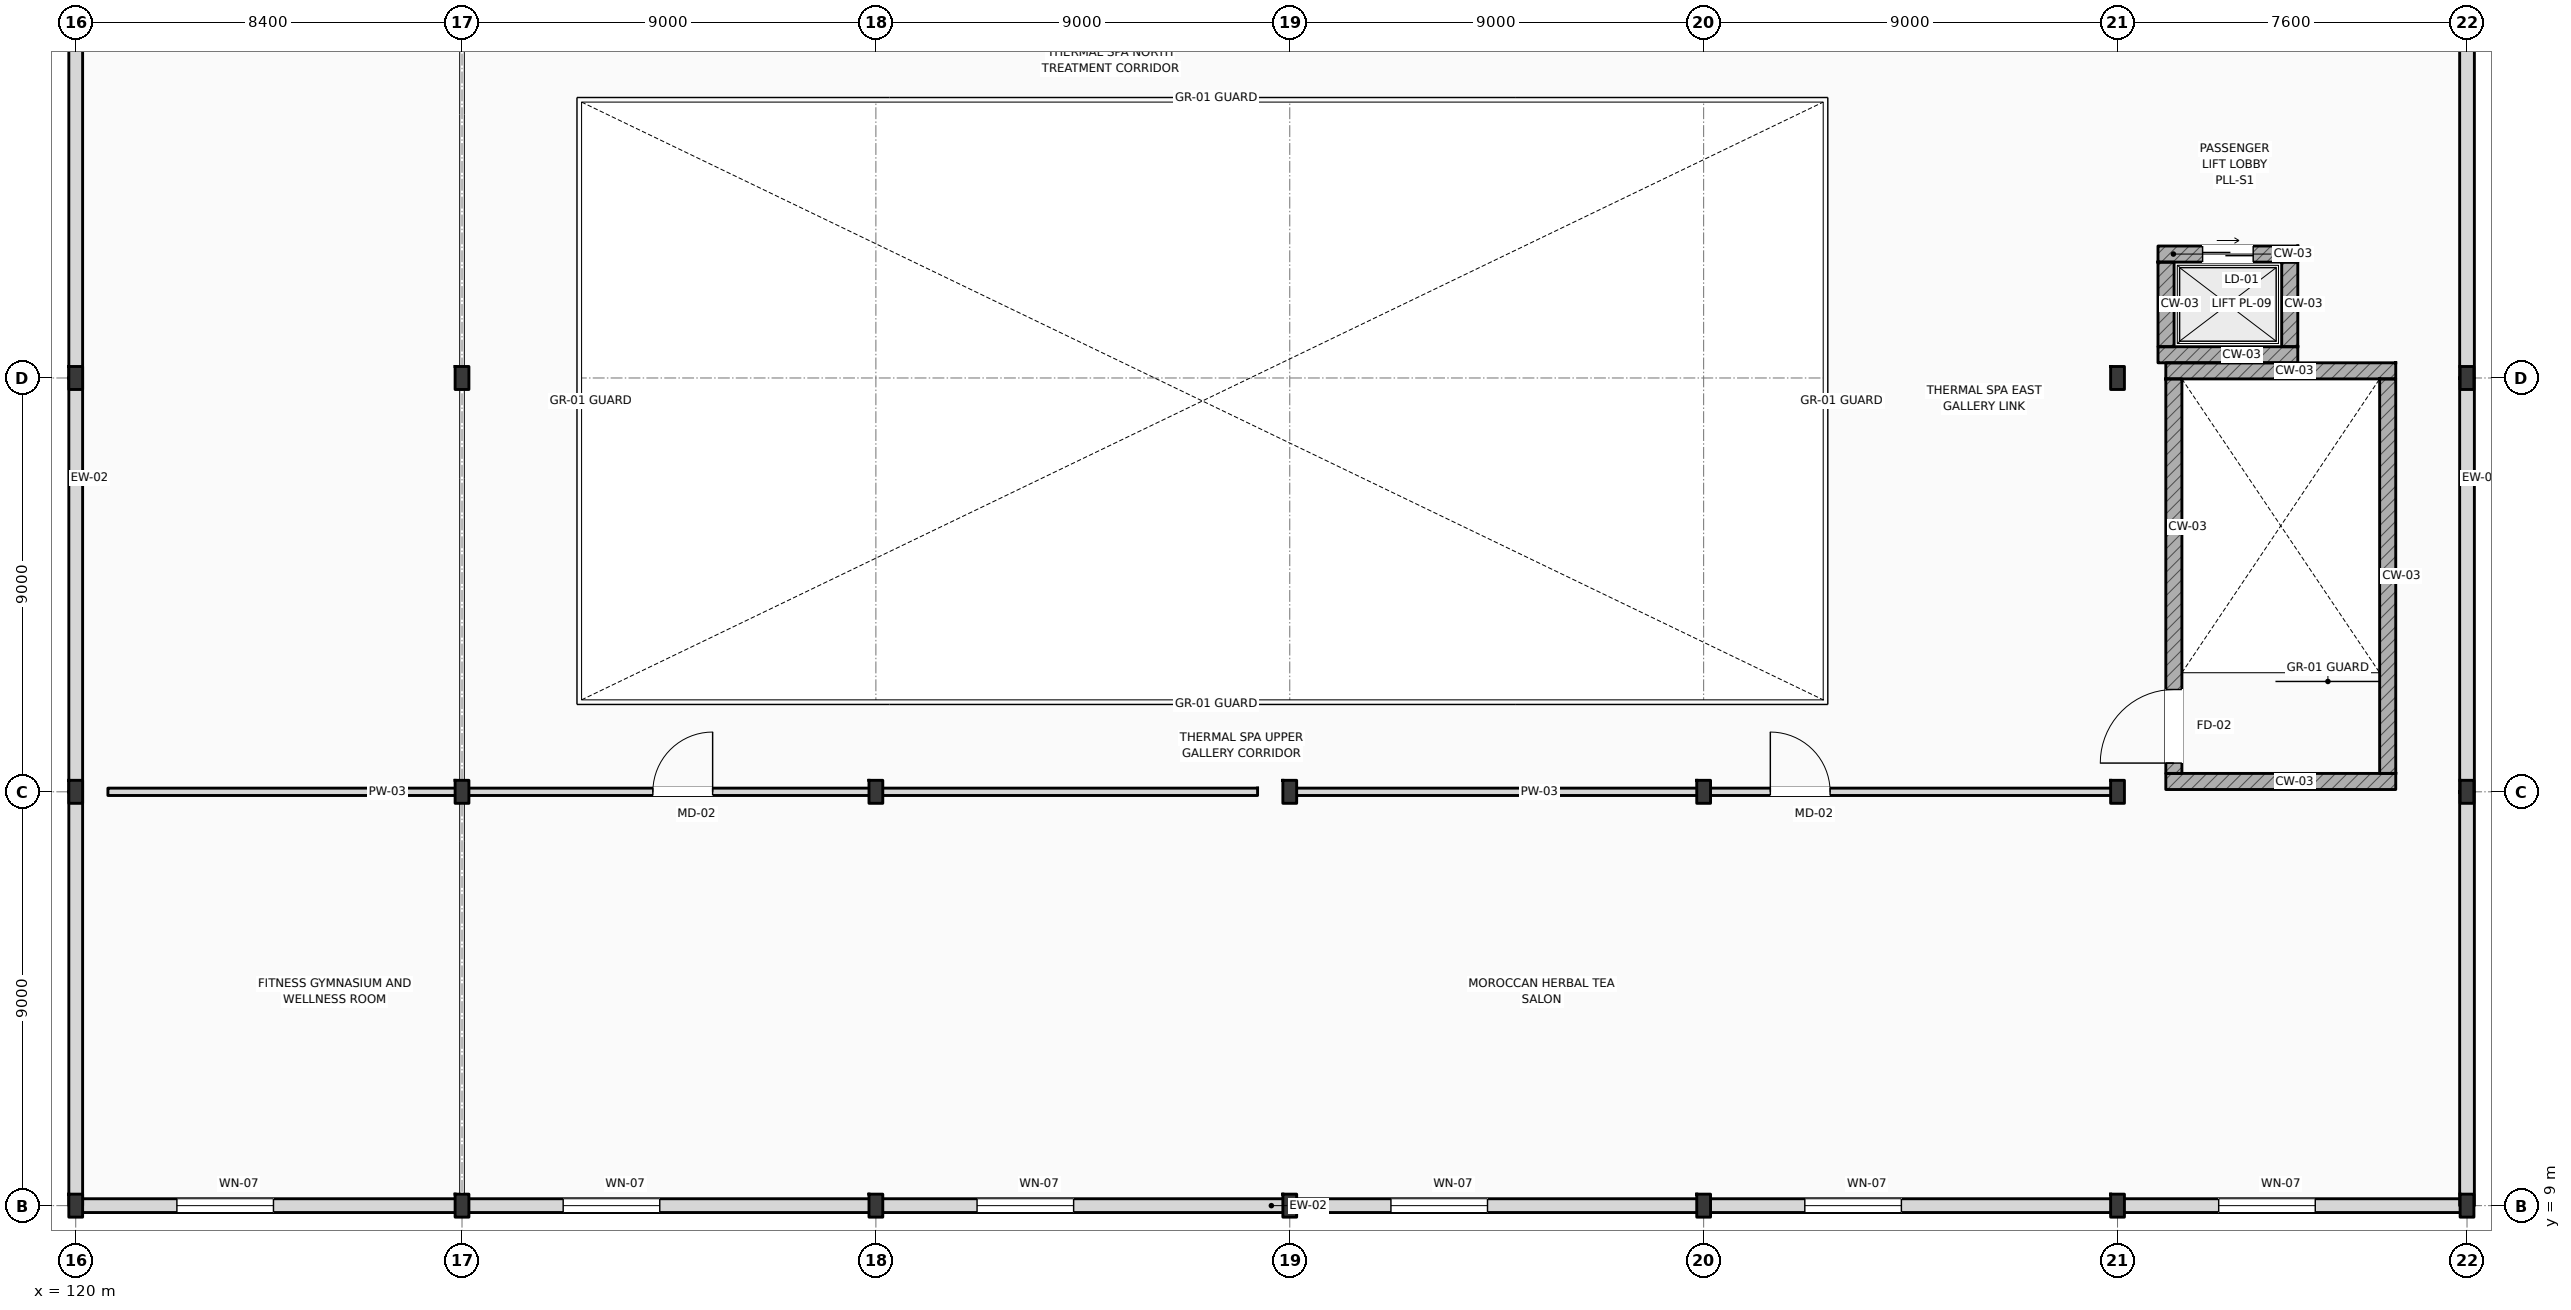
"""IFC4 building model, lengths in metres.
Left out: names, types, materials, properties, quantities, classifications, styles, units other than length and angle.
Written with IfcOpenShell. Run it as: python <this file> out.ifc"""

import sys

from ifc_helpers import new_model, si_unit, direction, frame, frame_2d, origin, origin_2d, place, context, subcontext, project, spatial, rectangle, i_section, extrude, element, fill, save


model = new_model("IFC4")
c1 = context("Model", 3, precision=1e-05, world=origin(), true_north=direction((0.0, 1.0)))
c2 = subcontext(c1, "Body", "Model", "MODEL_VIEW")
j1 = project(units=[si_unit("LENGTHUNIT", "METRE"), si_unit("PLANEANGLEUNIT", "RADIAN")], contexts=[c1])
p1 = place(None, origin())
s1 = spatial("IfcSite", under=j1, at=p1, CompositionType="ELEMENT")
p2 = place(p1, origin())
s2 = spatial("IfcBuilding", under=s1, at=p2, CompositionType="ELEMENT")
p3 = place(p2, frame((0.0, 0.0, 6.0)))
s3 = spatial("IfcBuildingStorey", under=s2, at=p3, CompositionType="ELEMENT", Elevation=6.0)
for number, where, z_axis, x_axis in (
    (1, (120.0, 9.0, 0.0), (0.0, 0.0, 1.0), (1.0, 0.0, 0.0)),
    (2, (120.0, 18.0, 0.0), (0.0, 0.0, 1.0), (1.0, 0.0, 0.0)),
    (3, (120.0, 27.0, 0.0), (0.0, 0.0, 1.0), (1.0, 0.0, 0.0)),
    (4, (128.4, 9.0, 0.0), (0.0, 0.0, 1.0), (1.0, 0.0, 0.0)),
    (5, (128.4, 18.0, 0.0), (0.0, 0.0, 1.0), (1.0, 0.0, 0.0)),
    (6, (128.4, 27.0, 0.0), (0.0, 0.0, 1.0), (1.0, 0.0, 0.0)),
    (7, (137.4, 9.0, 0.0), (0.0, 0.0, 1.0), (1.0, 0.0, 0.0)),
    (8, (137.4, 18.0, 0.0), (0.0, 0.0, 1.0), (1.0, 0.0, 0.0)),
    (9, (146.4, 9.0, 0.0), (0.0, 0.0, 1.0), (1.0, 0.0, 0.0)),
    (10, (146.4, 18.0, 0.0), (0.0, 0.0, 1.0), (1.0, 0.0, 0.0)),
    (11, (155.4, 9.0, 0.0), (0.0, 0.0, 1.0), (1.0, 0.0, 0.0)),
    (12, (155.4, 18.0, 0.0), (0.0, 0.0, 1.0), (1.0, 0.0, 0.0)),
    (13, (164.4, 9.0, 0.0), (0.0, 0.0, 1.0), (1.0, 0.0, 0.0)),
    (14, (164.4, 18.0, 0.0), (0.0, 0.0, 1.0), (1.0, 0.0, 0.0)),
    (15, (164.4, 27.0, 0.0), (0.0, 0.0, 1.0), (1.0, 0.0, 0.0)),
    (16, (172.0, 9.0, 0.0), (0.0, 0.0, 1.0), (1.0, 0.0, 0.0)),
    (17, (172.0, 18.0, 0.0), (0.0, 0.0, 1.0), (1.0, 0.0, 0.0)),
    (18, (172.0, 27.0, 0.0), (0.0, 0.0, 1.0), (1.0, 0.0, 0.0)),
):
    element("IfcColumn", number, at=place(p3, frame(where, z_axis=z_axis, x_axis=x_axis)), inside=s3, PredefinedType="COLUMN", context=c2, shape_type="SweptSolid", body=[
        extrude(i_section(OverallWidth=0.3, OverallDepth=0.5, WebThickness=0.014, FlangeThickness=0.028, FilletRadius=0.027, at=origin_2d()), origin(), (0.0, 0.0, 1.0), 5.4),
    ])
for number, where, z_axis, x_axis in (
    (19, (165.45, 27.155, 0.0), (0.0, 0.0, 1.0), (1.0, 0.0, 0.0)),
    (20, (165.45, 18.225, 0.0), (0.0, 0.0, 1.0), (1.0, 0.0, 0.0)),
):
    element("IfcWall", number, at=place(p3, frame(where, z_axis=z_axis, x_axis=x_axis)), inside=s3, PredefinedType="SHEAR", context=c2, shape_type="SweptSolid", body=[
        extrude(rectangle(XDim=5.0, YDim=0.35, at=frame_2d((2.5, 0.0))), origin(), (0.0, 0.0, 1.0), 5.4),
    ])
p4 = place(p3, frame((165.625, 18.4, 0.0), z_axis=(0.0, 0.0, 1.0), x_axis=(0.0, 1.0, 0.0)))
e21 = element("IfcWall", 21, at=p4, inside=s3, PredefinedType="SHEAR", context=c2, shape_type="SweptSolid", body=[
    extrude(rectangle(XDim=8.58, YDim=0.35, at=frame_2d((4.29, 0.0))), origin(), (0.0, 0.0, 1.0), 5.4),
])
p5 = place(p4, frame((0.225, 0.0, 0.0)))
e22 = element("IfcOpeningElement", 22, at=p5, cuts=e21, PredefinedType="OPENING", context=c2, shape_type="SweptSolid", body=[
    extrude(rectangle(XDim=1.6, YDim=2.2, at=frame_2d((0.8, 1.1))), frame((0.0, 0.185, 0.0), z_axis=(0.0, -1.0, 0.0), x_axis=(1.0, 0.0, 0.0)), (0.0, 0.0, 1.0), 0.37),
])
p6 = place(p3, frame((170.275, 18.4, 0.0), z_axis=(0.0, 0.0, 1.0), x_axis=(0.0, 1.0, 0.0)))
e23 = element("IfcWall", 23, at=p6, inside=s3, PredefinedType="SHEAR", context=c2, shape_type="SweptSolid", body=[
    extrude(rectangle(XDim=8.58, YDim=0.35, at=frame_2d((4.29, 0.0))), origin(), (0.0, 0.0, 1.0), 5.4),
])
p7 = place(p3, frame((120.0, 9.0, 0.0), z_axis=(0.0, 0.0, 1.0), x_axis=(1.0, 0.0, 0.0)))
e24 = element("IfcWall", 24, at=p7, inside=s3, PredefinedType="STANDARD", context=c2, shape_type="SweptSolid", body=[
    extrude(rectangle(XDim=8.4, YDim=0.3, at=frame_2d((4.2, 0.0))), origin(), (0.0, 0.0, 1.0), 4.49),
])
p8 = place(p7, frame((2.2, 0.0, 1.05)))
e25 = element("IfcOpeningElement", 25, at=p8, cuts=e24, PredefinedType="OPENING", context=c2, shape_type="SweptSolid", body=[
    extrude(rectangle(XDim=2.1, YDim=2.2, at=frame_2d((1.05, 1.1))), frame((0.0, 0.16, 0.0), z_axis=(0.0, -1.0, 0.0), x_axis=(1.0, 0.0, 0.0)), (0.0, 0.0, 1.0), 0.32),
])
p9 = place(p3, frame((128.4, 9.0, 0.0), z_axis=(0.0, 0.0, 1.0), x_axis=(1.0, 0.0, 0.0)))
e26 = element("IfcWall", 26, at=p9, inside=s3, PredefinedType="STANDARD", context=c2, shape_type="SweptSolid", body=[
    extrude(rectangle(XDim=9.0, YDim=0.3, at=frame_2d((4.5, 0.0))), origin(), (0.0, 0.0, 1.0), 4.44),
])
p10 = place(p9, frame((2.2, 0.0, 1.05)))
e27 = element("IfcOpeningElement", 27, at=p10, cuts=e26, PredefinedType="OPENING", context=c2, shape_type="SweptSolid", body=[
    extrude(rectangle(XDim=2.1, YDim=2.2, at=frame_2d((1.05, 1.1))), frame((0.0, 0.16, 0.0), z_axis=(0.0, -1.0, 0.0), x_axis=(1.0, 0.0, 0.0)), (0.0, 0.0, 1.0), 0.32),
])
p11 = place(p3, frame((137.4, 9.0, 0.0), z_axis=(0.0, 0.0, 1.0), x_axis=(1.0, 0.0, 0.0)))
e28 = element("IfcWall", 28, at=p11, inside=s3, PredefinedType="STANDARD", context=c2, shape_type="SweptSolid", body=[
    extrude(rectangle(XDim=9.0, YDim=0.3, at=frame_2d((4.5, 0.0))), origin(), (0.0, 0.0, 1.0), 4.44),
])
p12 = place(p11, frame((2.2, 0.0, 1.05)))
e29 = element("IfcOpeningElement", 29, at=p12, cuts=e28, PredefinedType="OPENING", context=c2, shape_type="SweptSolid", body=[
    extrude(rectangle(XDim=2.1, YDim=2.2, at=frame_2d((1.05, 1.1))), frame((0.0, 0.16, 0.0), z_axis=(0.0, -1.0, 0.0), x_axis=(1.0, 0.0, 0.0)), (0.0, 0.0, 1.0), 0.32),
])
p13 = place(p3, frame((146.4, 9.0, 0.0), z_axis=(0.0, 0.0, 1.0), x_axis=(1.0, 0.0, 0.0)))
e30 = element("IfcWall", 30, at=p13, inside=s3, PredefinedType="STANDARD", context=c2, shape_type="SweptSolid", body=[
    extrude(rectangle(XDim=9.0, YDim=0.3, at=frame_2d((4.5, 0.0))), origin(), (0.0, 0.0, 1.0), 4.44),
])
p14 = place(p13, frame((2.2, 0.0, 1.05)))
e31 = element("IfcOpeningElement", 31, at=p14, cuts=e30, PredefinedType="OPENING", context=c2, shape_type="SweptSolid", body=[
    extrude(rectangle(XDim=2.1, YDim=2.2, at=frame_2d((1.05, 1.1))), frame((0.0, 0.16, 0.0), z_axis=(0.0, -1.0, 0.0), x_axis=(1.0, 0.0, 0.0)), (0.0, 0.0, 1.0), 0.32),
])
p15 = place(p3, frame((155.4, 9.0, 0.0), z_axis=(0.0, 0.0, 1.0), x_axis=(1.0, 0.0, 0.0)))
e32 = element("IfcWall", 32, at=p15, inside=s3, PredefinedType="STANDARD", context=c2, shape_type="SweptSolid", body=[
    extrude(rectangle(XDim=9.0, YDim=0.3, at=frame_2d((4.5, 0.0))), origin(), (0.0, 0.0, 1.0), 4.44),
])
p16 = place(p15, frame((2.2, 0.0, 1.05)))
e33 = element("IfcOpeningElement", 33, at=p16, cuts=e32, PredefinedType="OPENING", context=c2, shape_type="SweptSolid", body=[
    extrude(rectangle(XDim=2.1, YDim=2.2, at=frame_2d((1.05, 1.1))), frame((0.0, 0.16, 0.0), z_axis=(0.0, -1.0, 0.0), x_axis=(1.0, 0.0, 0.0)), (0.0, 0.0, 1.0), 0.32),
])
p17 = place(p3, frame((164.4, 9.0, 0.0), z_axis=(0.0, 0.0, 1.0), x_axis=(1.0, 0.0, 0.0)))
e34 = element("IfcWall", 34, at=p17, inside=s3, PredefinedType="STANDARD", context=c2, shape_type="SweptSolid", body=[
    extrude(rectangle(XDim=7.6, YDim=0.3, at=frame_2d((3.8, 0.0))), origin(), (0.0, 0.0, 1.0), 4.54),
])
p18 = place(p17, frame((2.2, 0.0, 1.05)))
e35 = element("IfcOpeningElement", 35, at=p18, cuts=e34, PredefinedType="OPENING", context=c2, shape_type="SweptSolid", body=[
    extrude(rectangle(XDim=2.1, YDim=2.2, at=frame_2d((1.05, 1.1))), frame((0.0, 0.16, 0.0), z_axis=(0.0, -1.0, 0.0), x_axis=(1.0, 0.0, 0.0)), (0.0, 0.0, 1.0), 0.32),
])
p19 = place(p3, frame((172.0, 9.0, 0.0), z_axis=(0.0, 0.0, 1.0), x_axis=(0.0, 1.0, 0.0)))
e36 = element("IfcWall", 36, at=p19, inside=s3, PredefinedType="STANDARD", context=c2, shape_type="SweptSolid", body=[
    extrude(rectangle(XDim=9.0, YDim=0.32, at=frame_2d((4.5, 0.0))), origin(), (0.0, 0.0, 1.0), 4.55),
])
p20 = place(p3, frame((120.0, 9.0, 0.0), z_axis=(0.0, 0.0, 1.0), x_axis=(0.0, 1.0, 0.0)))
e37 = element("IfcWall", 37, at=p20, inside=s3, PredefinedType="STANDARD", context=c2, shape_type="SweptSolid", body=[
    extrude(rectangle(XDim=9.0, YDim=0.3, at=frame_2d((4.5, 0.0))), origin(), (0.0, 0.0, 1.0), 4.55),
])
p21 = place(p3, frame((172.0, 18.0, 0.0), z_axis=(0.0, 0.0, 1.0), x_axis=(0.0, 1.0, 0.0)))
e38 = element("IfcWall", 38, at=p21, inside=s3, PredefinedType="STANDARD", context=c2, shape_type="SweptSolid", body=[
    extrude(rectangle(XDim=9.0, YDim=0.32, at=frame_2d((4.5, 0.0))), origin(), (0.0, 0.0, 1.0), 4.55),
])
p22 = place(p3, frame((120.0, 18.0, 0.0), z_axis=(0.0, 0.0, 1.0), x_axis=(0.0, 1.0, 0.0)))
e39 = element("IfcWall", 39, at=p22, inside=s3, PredefinedType="STANDARD", context=c2, shape_type="SweptSolid", body=[
    extrude(rectangle(XDim=9.0, YDim=0.3, at=frame_2d((4.5, 0.0))), origin(), (0.0, 0.0, 1.0), 4.55),
])
p23 = place(p3, frame((172.0, 27.0, 0.0), z_axis=(0.0, 0.0, 1.0), x_axis=(0.0, 1.0, 0.0)))
e40 = element("IfcWall", 40, at=p23, inside=s3, PredefinedType="STANDARD", context=c2, shape_type="SweptSolid", body=[
    extrude(rectangle(XDim=9.0, YDim=0.32, at=frame_2d((4.5, 0.0))), origin(), (0.0, 0.0, 1.0), 4.55),
])
p24 = place(p3, frame((120.0, 27.0, 0.0), z_axis=(0.0, 0.0, 1.0), x_axis=(0.0, 1.0, 0.0)))
e41 = element("IfcWall", 41, at=p24, inside=s3, PredefinedType="STANDARD", context=c2, shape_type="SweptSolid", body=[
    extrude(rectangle(XDim=9.0, YDim=0.3, at=frame_2d((4.5, 0.0))), origin(), (0.0, 0.0, 1.0), 4.55),
])
p25 = place(p3, frame((165.28, 29.695, 0.0), z_axis=(0.0, 0.0, 1.0), x_axis=(1.0, 0.0, 0.0)))
e42 = element("IfcWall", 42, at=p25, inside=s3, PredefinedType="SHEAR", context=c2, shape_type="SweptSolid", body=[
    extrude(rectangle(XDim=3.04, YDim=0.35, at=frame_2d((1.52, 0.0))), origin(), (0.0, 0.0, 1.0), 5.05),
])
p26 = place(p25, frame((0.97, 0.0, 0.0)))
e43 = element("IfcOpeningElement", 43, at=p26, cuts=e42, PredefinedType="OPENING", context=c2, shape_type="SweptSolid", body=[
    extrude(rectangle(XDim=1.1, YDim=2.2, at=frame_2d((0.55, 1.1))), frame((0.0, 0.185, 0.0), z_axis=(0.0, -1.0, 0.0), x_axis=(1.0, 0.0, 0.0)), (0.0, 0.0, 1.0), 0.37),
])
p27 = place(p3, frame((165.28, 27.505, 0.0), z_axis=(0.0, 0.0, 1.0), x_axis=(1.0, 0.0, 0.0)))
e44 = element("IfcWall", 44, at=p27, inside=s3, PredefinedType="SHEAR", context=c2, shape_type="SweptSolid", body=[
    extrude(rectangle(XDim=3.04, YDim=0.35, at=frame_2d((1.52, 0.0))), origin(), (0.0, 0.0, 1.0), 5.05),
])
for number, where, z_axis, x_axis in (
    (45, (165.455, 27.68, 0.0), (0.0, 0.0, 1.0), (0.0, 1.0, 0.0)),
    (46, (168.145, 27.68, 0.0), (0.0, 0.0, 1.0), (0.0, 1.0, 0.0)),
):
    element("IfcWall", number, at=place(p3, frame(where, z_axis=z_axis, x_axis=x_axis)), inside=s3, PredefinedType="SHEAR", context=c2, shape_type="SweptSolid", body=[
        extrude(rectangle(XDim=1.84, YDim=0.35, at=frame_2d((0.92, 0.0))), origin(), (0.0, 0.0, 1.0), 5.05),
    ])
p28 = place(p3, frame((120.7, 18.0, 0.0), z_axis=(0.0, 0.0, 1.0), x_axis=(1.0, 0.0, 0.0)))
e47 = element("IfcWall", 47, at=p28, inside=s3, PredefinedType="PARTITIONING", context=c2, shape_type="SweptSolid", body=[
    extrude(rectangle(XDim=25.0, YDim=0.16, at=frame_2d((12.5, 0.0))), origin(), (0.0, 0.0, 1.0), 4.44),
])
p29 = place(p28, frame((11.85, 0.0, 0.0)))
e48 = element("IfcOpeningElement", 48, at=p29, cuts=e47, PredefinedType="OPENING", context=c2, shape_type="SweptSolid", body=[
    extrude(rectangle(XDim=1.3, YDim=2.2, at=frame_2d((0.65, 1.1))), frame((0.0, 0.09, 0.0), z_axis=(0.0, -1.0, 0.0), x_axis=(1.0, 0.0, 0.0)), (0.0, 0.0, 1.0), 0.18),
])
p30 = place(p3, frame((146.5, 18.0, 0.0), z_axis=(0.0, 0.0, 1.0), x_axis=(1.0, 0.0, 0.0)))
e49 = element("IfcWall", 49, at=p30, inside=s3, PredefinedType="PARTITIONING", context=c2, shape_type="SweptSolid", body=[
    extrude(rectangle(XDim=18.0, YDim=0.16, at=frame_2d((9.0, 0.0))), origin(), (0.0, 0.0, 1.0), 4.44),
])
p31 = place(p30, frame((10.35, 0.0, 0.0)))
e50 = element("IfcOpeningElement", 50, at=p31, cuts=e49, PredefinedType="OPENING", context=c2, shape_type="SweptSolid", body=[
    extrude(rectangle(XDim=1.3, YDim=2.2, at=frame_2d((0.65, 1.1))), frame((0.0, 0.09, 0.0), z_axis=(0.0, -1.0, 0.0), x_axis=(1.0, 0.0, 0.0)), (0.0, 0.0, 1.0), 0.18),
])
p32 = place(p8, origin())
e51 = element("IfcWindow", 51, at=p32, inside=s3, PartitioningType="DOUBLE_PANEL_VERTICAL", PredefinedType="WINDOW", context=c2, shape_type="SweptSolid", body=[
    extrude(rectangle(XDim=2.1, YDim=2.2, at=frame_2d((1.05, 1.1))), frame((0.0, 0.03, 0.0), z_axis=(0.0, -1.0, 0.0), x_axis=(1.0, 0.0, 0.0)), (0.0, 0.0, 1.0), 0.06),
])
fill(e25, e51)
p33 = place(p10, origin())
e52 = element("IfcWindow", 52, at=p33, inside=s3, PartitioningType="DOUBLE_PANEL_VERTICAL", PredefinedType="WINDOW", context=c2, shape_type="SweptSolid", body=[
    extrude(rectangle(XDim=2.1, YDim=2.2, at=frame_2d((1.05, 1.1))), frame((0.0, 0.03, 0.0), z_axis=(0.0, -1.0, 0.0), x_axis=(1.0, 0.0, 0.0)), (0.0, 0.0, 1.0), 0.06),
])
fill(e27, e52)
p34 = place(p12, origin())
e53 = element("IfcWindow", 53, at=p34, inside=s3, PartitioningType="DOUBLE_PANEL_VERTICAL", PredefinedType="WINDOW", context=c2, shape_type="SweptSolid", body=[
    extrude(rectangle(XDim=2.1, YDim=2.2, at=frame_2d((1.05, 1.1))), frame((0.0, 0.03, 0.0), z_axis=(0.0, -1.0, 0.0), x_axis=(1.0, 0.0, 0.0)), (0.0, 0.0, 1.0), 0.06),
])
fill(e29, e53)
p35 = place(p14, origin())
e54 = element("IfcWindow", 54, at=p35, inside=s3, PartitioningType="DOUBLE_PANEL_VERTICAL", PredefinedType="WINDOW", context=c2, shape_type="SweptSolid", body=[
    extrude(rectangle(XDim=2.1, YDim=2.2, at=frame_2d((1.05, 1.1))), frame((0.0, 0.03, 0.0), z_axis=(0.0, -1.0, 0.0), x_axis=(1.0, 0.0, 0.0)), (0.0, 0.0, 1.0), 0.06),
])
fill(e31, e54)
p36 = place(p16, origin())
e55 = element("IfcWindow", 55, at=p36, inside=s3, PartitioningType="DOUBLE_PANEL_VERTICAL", PredefinedType="WINDOW", context=c2, shape_type="SweptSolid", body=[
    extrude(rectangle(XDim=2.1, YDim=2.2, at=frame_2d((1.05, 1.1))), frame((0.0, 0.03, 0.0), z_axis=(0.0, -1.0, 0.0), x_axis=(1.0, 0.0, 0.0)), (0.0, 0.0, 1.0), 0.06),
])
fill(e33, e55)
p37 = place(p18, origin())
e56 = element("IfcWindow", 56, at=p37, inside=s3, PartitioningType="DOUBLE_PANEL_VERTICAL", PredefinedType="WINDOW", context=c2, shape_type="SweptSolid", body=[
    extrude(rectangle(XDim=2.1, YDim=2.2, at=frame_2d((1.05, 1.1))), frame((0.0, 0.03, 0.0), z_axis=(0.0, -1.0, 0.0), x_axis=(1.0, 0.0, 0.0)), (0.0, 0.0, 1.0), 0.06),
])
fill(e35, e56)
p38 = place(p5, origin())
e57 = element("IfcDoor", 57, at=p38, inside=s3, OperationType="SINGLE_SWING_LEFT", PredefinedType="DOOR", context=c2, shape_type="SweptSolid", body=[
    extrude(rectangle(XDim=1.6, YDim=2.2, at=frame_2d((0.8, 1.1))), frame((0.0, 0.025, 0.0), z_axis=(0.0, -1.0, 0.0), x_axis=(1.0, 0.0, 0.0)), (0.0, 0.0, 1.0), 0.05),
])
fill(e22, e57)
p39 = place(p26, origin())
e58 = element("IfcDoor", 58, at=p39, inside=s3, OperationType="SLIDING_TO_LEFT", PredefinedType="DOOR", context=c2, shape_type="SweptSolid", body=[
    extrude(rectangle(XDim=1.1, YDim=2.2, at=frame_2d((0.55, 1.1))), frame((0.0, 0.025, 0.0), z_axis=(0.0, -1.0, 0.0), x_axis=(1.0, 0.0, 0.0)), (0.0, 0.0, 1.0), 0.05),
])
fill(e43, e58)
p40 = place(p29, origin())
e59 = element("IfcDoor", 59, at=p40, inside=s3, OperationType="SINGLE_SWING_RIGHT", PredefinedType="DOOR", context=c2, shape_type="SweptSolid", body=[
    extrude(rectangle(XDim=1.3, YDim=2.2, at=frame_2d((0.65, 1.1))), frame((0.0, 0.025, 0.0), z_axis=(0.0, -1.0, 0.0), x_axis=(1.0, 0.0, 0.0)), (0.0, 0.0, 1.0), 0.05),
])
fill(e48, e59)
p41 = place(p31, origin())
e60 = element("IfcDoor", 60, at=p41, inside=s3, OperationType="SINGLE_SWING_LEFT", PredefinedType="DOOR", context=c2, shape_type="SweptSolid", body=[
    extrude(rectangle(XDim=1.3, YDim=2.2, at=frame_2d((0.65, 1.1))), frame((0.0, 0.025, 0.0), z_axis=(0.0, -1.0, 0.0), x_axis=(1.0, 0.0, 0.0)), (0.0, 0.0, 1.0), 0.05),
])
fill(e50, e60)
save(model, sys.argv[1])
